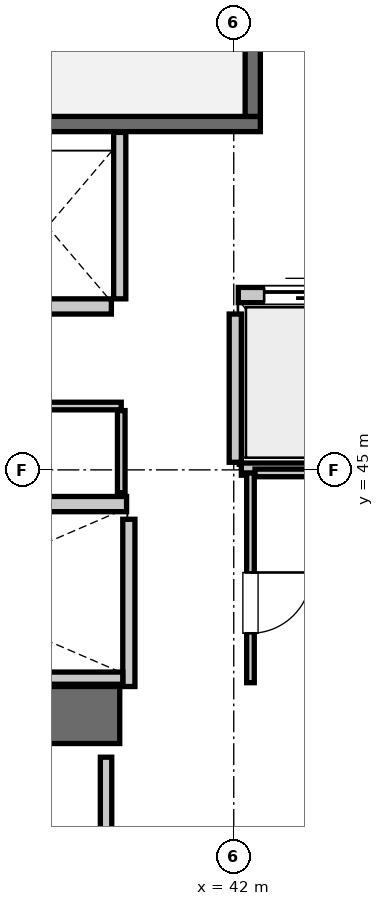
"""IFC4 building model, lengths in metres.
Left out: names, types, materials, properties, quantities, classifications, styles, units other than length and angle.
Written with IfcOpenShell. Run it as: python <this file> out.ifc"""

import sys

from ifc_helpers import new_model, si_unit, direction, frame, frame_2d, origin, place, context, subcontext, project, spatial, rectangle, extrude, element, fill, save


model = new_model("IFC4")
c1 = context("Model", 3, precision=1e-05, world=origin(), true_north=direction((0.0, 1.0)))
c2 = subcontext(c1, "Body", "Model", "MODEL_VIEW")
j1 = project(units=[si_unit("LENGTHUNIT", "METRE"), si_unit("PLANEANGLEUNIT", "RADIAN")], contexts=[c1])
p1 = place(None, origin())
s1 = spatial("IfcSite", under=j1, at=p1, CompositionType="ELEMENT")
p2 = place(p1, origin())
s2 = spatial("IfcBuilding", under=s1, at=p2, CompositionType="ELEMENT")
p3 = place(p2, frame((0.0, 0.0, 146.65)))
s3 = spatial("IfcBuildingStorey", under=s2, at=p3, CompositionType="ELEMENT", Elevation=146.65)
p4 = place(p3, frame((35.1, 41.775, 0.0), z_axis=(0.0, 0.0, 1.0), x_axis=(1.0, 0.0, 0.0)))
e1 = element("IfcWall", 1, at=p4, inside=s3, PredefinedType="SHEAR", context=c2, shape_type="SweptSolid", body=[
    extrude(rectangle(XDim=5.4, YDim=0.75, at=frame_2d((2.7, 0.0))), origin(), (0.0, 0.0, 1.0), 3.85),
])
p5 = place(p3, frame((33.25, 49.55, 0.0), z_axis=(0.0, 0.0, 1.0), x_axis=(1.0, 0.0, 0.0)))
e2 = element("IfcWall", 2, at=p5, inside=s3, PredefinedType="SOLIDWALL", context=c2, shape_type="SweptSolid", body=[
    extrude(rectangle(XDim=9.1, YDim=0.2, at=frame_2d((4.55, 0.0))), origin(), (0.0, 0.0, 1.0), 3.61),
])
p6 = place(p3, frame((42.25, 49.65, 0.0), z_axis=(0.0, 0.0, 1.0), x_axis=(0.0, 1.0, 0.0)))
e3 = element("IfcWall", 3, at=p6, inside=s3, PredefinedType="SOLIDWALL", context=c2, shape_type="SweptSolid", body=[
    extrude(rectangle(XDim=3.6, YDim=0.2, at=frame_2d((1.8, 0.0))), origin(), (0.0, 0.0, 1.0), 3.61),
])
p7 = place(p3, frame((42.06, 47.3, 0.0), z_axis=(0.0, 0.0, 1.0), x_axis=(1.0, 0.0, 0.0)))
e4 = element("IfcWall", 4, at=p7, inside=s3, PredefinedType="SOLIDWALL", context=c2, shape_type="SweptSolid", body=[
    extrude(rectangle(XDim=1.68, YDim=0.2, at=frame_2d((0.84, 0.0))), origin(), (0.0, 0.0, 1.0), 3.61),
])
p8 = place(p7, frame((0.34, 0.0, 0.0)))
e5 = element("IfcOpeningElement", 5, at=p8, cuts=e4, PredefinedType="OPENING", context=c2, shape_type="SweptSolid", body=[
    extrude(rectangle(XDim=1.0, YDim=2.15, at=frame_2d((0.5, 1.075))), frame((0.0, 0.11, 0.0), z_axis=(0.0, -1.0, 0.0), x_axis=(1.0, 0.0, 0.0)), (0.0, 0.0, 1.0), 0.22),
])
p9 = place(p3, frame((38.91, 44.55, 0.0), z_axis=(0.0, 0.0, 1.0), x_axis=(1.0, 0.0, 0.0)))
e6 = element("IfcWall", 6, at=p9, inside=s3, PredefinedType="SOLIDWALL", context=c2, shape_type="SweptSolid", body=[
    extrude(rectangle(XDim=1.68, YDim=0.2, at=frame_2d((0.84, 0.0))), origin(), (0.0, 0.0, 1.0), 3.61),
])
p10 = place(p3, frame((38.71, 47.15, 0.0), z_axis=(0.0, 0.0, 1.0), x_axis=(1.0, 0.0, 0.0)))
e7 = element("IfcWall", 7, at=p10, inside=s3, PredefinedType="SOLIDWALL", context=c2, shape_type="SweptSolid", body=[
    extrude(rectangle(XDim=1.68, YDim=0.2, at=frame_2d((0.84, 0.0))), origin(), (0.0, 0.0, 1.0), 3.61),
])
p11 = place(p3, frame((42.02, 45.1, 0.0), z_axis=(0.0, 0.0, 1.0), x_axis=(0.0, 1.0, 0.0)))
e8 = element("IfcWall", 8, at=p11, inside=s3, PredefinedType="SOLIDWALL", context=c2, shape_type="SweptSolid", body=[
    extrude(rectangle(XDim=1.95, YDim=0.16, at=frame_2d((0.975, 0.0))), origin(), (0.0, 0.0, 1.0), 3.61),
])
p12 = place(p3, frame((42.1, 45.01, 0.0), z_axis=(0.0, 0.0, 1.0), x_axis=(1.0, 0.0, 0.0)))
e9 = element("IfcWall", 9, at=p12, inside=s3, PredefinedType="SOLIDWALL", context=c2, shape_type="SweptSolid", body=[
    extrude(rectangle(XDim=3.45, YDim=0.16, at=frame_2d((1.725, 0.0))), origin(), (0.0, 0.0, 1.0), 3.61),
])
p13 = place(p3, frame((40.62, 42.15, 0.0), z_axis=(0.0, 0.0, 1.0), x_axis=(0.0, 1.0, 0.0)))
e10 = element("IfcWall", 10, at=p13, inside=s3, PredefinedType="SOLIDWALL", context=c2, shape_type="SweptSolid", body=[
    extrude(rectangle(XDim=2.2, YDim=0.16, at=frame_2d((1.1, 0.0))), origin(), (0.0, 0.0, 1.0), 3.61),
])
p14 = place(p3, frame((35.52, 42.26, 0.0), z_axis=(0.0, 0.0, 1.0), x_axis=(1.0, 0.0, 0.0)))
e11 = element("IfcWall", 11, at=p14, inside=s3, PredefinedType="SOLIDWALL", context=c2, shape_type="SweptSolid", body=[
    extrude(rectangle(XDim=5.02, YDim=0.16, at=frame_2d((2.51, 0.0))), origin(), (0.0, 0.0, 1.0), 3.61),
])
p15 = place(p3, frame((40.5, 47.25, 0.0), z_axis=(0.0, 0.0, 1.0), x_axis=(0.0, 1.0, 0.0)))
e12 = element("IfcWall", 12, at=p15, inside=s3, PredefinedType="SOLIDWALL", context=c2, shape_type="SweptSolid", body=[
    extrude(rectangle(XDim=2.19, YDim=0.16, at=frame_2d((1.095, 0.0))), origin(), (0.0, 0.0, 1.0), 3.61),
])
p16 = place(p3, frame((38.02, 45.84, 0.0), z_axis=(0.0, 0.0, 1.0), x_axis=(1.0, 0.0, 0.0)))
e13 = element("IfcWall", 13, at=p16, inside=s3, PredefinedType="PARTITIONING", context=c2, shape_type="SweptSolid", body=[
    extrude(rectangle(XDim=2.5, YDim=0.1, at=frame_2d((1.25, 0.0))), origin(), (0.0, 0.0, 1.0), 3.61),
])
p17 = place(p16, frame((0.75, 0.0, 0.0)))
e14 = element("IfcOpeningElement", 14, at=p17, cuts=e13, PredefinedType="OPENING", context=c2, shape_type="SweptSolid", body=[
    extrude(rectangle(XDim=0.8, YDim=2.05, at=frame_2d((0.4, 1.025))), frame((0.0, 0.06, 0.0), z_axis=(0.0, -1.0, 0.0), x_axis=(1.0, 0.0, 0.0)), (0.0, 0.0, 1.0), 0.12),
])
p18 = place(p3, frame((40.52, 44.7, 0.0), z_axis=(0.0, 0.0, 1.0), x_axis=(0.0, 1.0, 0.0)))
e15 = element("IfcWall", 15, at=p18, inside=s3, PredefinedType="PARTITIONING", context=c2, shape_type="SweptSolid", body=[
    extrude(rectangle(XDim=1.08, YDim=0.1, at=frame_2d((0.54, 0.0))), origin(), (0.0, 0.0, 1.0), 3.61),
])
p19 = place(p3, frame((42.22, 42.2, 0.0), z_axis=(0.0, 0.0, 1.0), x_axis=(0.0, 1.0, 0.0)))
e16 = element("IfcWall", 16, at=p19, inside=s3, PredefinedType="PARTITIONING", context=c2, shape_type="SweptSolid", body=[
    extrude(rectangle(XDim=2.76, YDim=0.1, at=frame_2d((1.38, 0.0))), origin(), (0.0, 0.0, 1.0), 3.61),
])
p20 = place(p19, frame((0.65, 0.0, 0.0)))
e17 = element("IfcOpeningElement", 17, at=p20, cuts=e16, PredefinedType="OPENING", context=c2, shape_type="SweptSolid", body=[
    extrude(rectangle(XDim=0.8, YDim=2.05, at=frame_2d((0.4, 1.025))), frame((0.0, 0.06, 0.0), z_axis=(0.0, -1.0, 0.0), x_axis=(1.0, 0.0, 0.0)), (0.0, 0.0, 1.0), 0.12),
])
p21 = place(p3, frame((42.28, 44.96, 0.0), z_axis=(0.0, 0.0, 1.0), x_axis=(1.0, 0.0, 0.0)))
e18 = element("IfcWall", 18, at=p21, inside=s3, PredefinedType="PARTITIONING", context=c2, shape_type="SweptSolid", body=[
    extrude(rectangle(XDim=1.3, YDim=0.1, at=frame_2d((0.65, 0.0))), origin(), (0.0, 0.0, 1.0), 3.61),
])
p22 = place(p3, frame((40.32, 38.38, 0.0), z_axis=(0.0, 0.0, 1.0), x_axis=(0.0, 1.0, 0.0)))
e19 = element("IfcWall", 19, at=p22, inside=s3, PredefinedType="PARTITIONING", context=c2, shape_type="SweptSolid", body=[
    extrude(rectangle(XDim=2.84, YDim=0.15, at=frame_2d((1.42, 0.0))), origin(), (0.0, 0.0, 1.0), 3.61),
])
p23 = place(p8, origin())
e20 = element("IfcDoor", 20, at=p23, inside=s3, OperationType="SLIDING_TO_LEFT", PredefinedType="DOOR", context=c2, shape_type="SweptSolid", body=[
    extrude(rectangle(XDim=1.0, YDim=2.15, at=frame_2d((0.5, 1.075))), frame((0.0, 0.025, 0.0), z_axis=(0.0, -1.0, 0.0), x_axis=(1.0, 0.0, 0.0)), (0.0, 0.0, 1.0), 0.05),
])
fill(e5, e20)
p24 = place(p20, frame((0.8, 0.0, 0.0), z_axis=(0.0, 0.0, 1.0), x_axis=(-1.0, 0.0, 0.0)))
e21 = element("IfcDoor", 21, at=p24, inside=s3, OperationType="SINGLE_SWING_LEFT", PredefinedType="DOOR", context=c2, shape_type="SweptSolid", body=[
    extrude(rectangle(XDim=0.8, YDim=2.05, at=frame_2d((0.4, 1.025))), frame((0.0, 0.025, 0.0), z_axis=(0.0, -1.0, 0.0), x_axis=(1.0, 0.0, 0.0)), (0.0, 0.0, 1.0), 0.05),
])
fill(e17, e21)
save(model, sys.argv[1])
